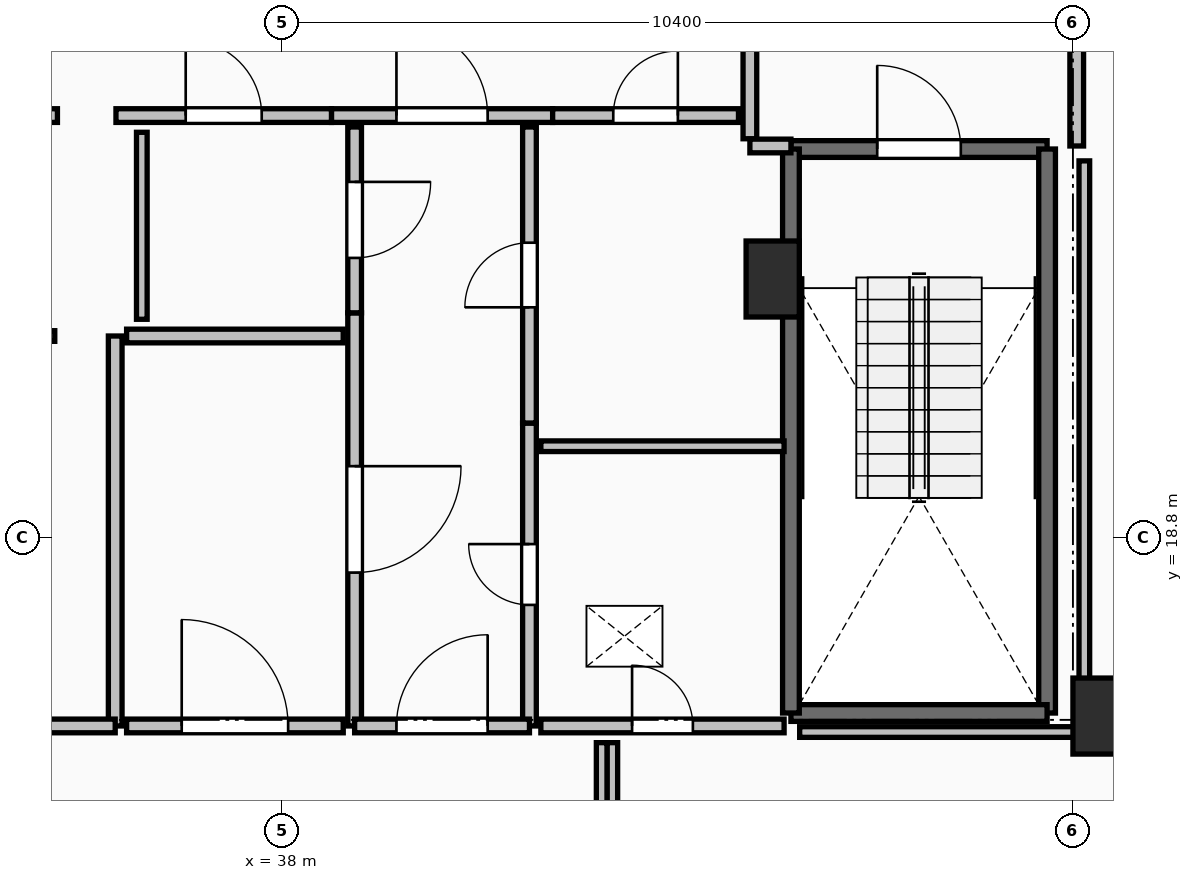
"""IFC4 building model, lengths in metres.
Left out: names, types, materials, properties, quantities, classifications, styles, units other than length and angle.
Written with IfcOpenShell. Run it as: python <this file> out.ifc"""

import sys

from ifc_helpers import new_model, si_unit, direction, frame, frame_2d, origin, origin_2d, place, context, subcontext, project, spatial, rectangle, extrude, element, fill, save


model = new_model("IFC4")
c1 = context("Model", 3, precision=1e-05, world=origin(), true_north=direction((0.0, 1.0)))
c2 = subcontext(c1, "Body", "Model", "MODEL_VIEW")
j1 = project(units=[si_unit("LENGTHUNIT", "METRE"), si_unit("PLANEANGLEUNIT", "RADIAN")], contexts=[c1])
p1 = place(None, origin())
s1 = spatial("IfcSite", under=j1, at=p1, CompositionType="ELEMENT")
p2 = place(p1, origin())
s2 = spatial("IfcBuilding", under=s1, at=p2, CompositionType="ELEMENT")
p3 = place(p2, frame((0.0, 0.0, 252.0)))
s3 = spatial("IfcBuildingStorey", under=s2, at=p3, CompositionType="ELEMENT", Elevation=252.0)
for number, where, z_axis, x_axis in (
    (1, (48.75, 16.45, 0.0), (0.0, 0.0, 1.0), (1.0, 0.0, 0.0)),
    (2, (44.45, 22.2, 0.0), (0.0, 0.0, 1.0), (1.0, 0.0, 0.0)),
):
    element("IfcColumn", number, at=place(p3, frame(where, z_axis=z_axis, x_axis=x_axis)), inside=s3, PredefinedType="PILASTER", context=c2, shape_type="SweptSolid", body=[
        extrude(rectangle(XDim=0.7, YDim=1.0, at=origin_2d()), origin(), (0.0, 0.0, 1.0), 3.55),
    ])
p4 = place(p3, frame((44.69, 23.91, 0.0), z_axis=(0.0, 0.0, 1.0), x_axis=(1.0, 0.0, 0.0)))
e3 = element("IfcWall", 3, at=p4, inside=s3, PredefinedType="SOLIDWALL", context=c2, shape_type="SweptSolid", body=[
    extrude(rectangle(XDim=3.37, YDim=0.22, at=frame_2d((1.685, 0.0))), origin(), (0.0, 0.0, 1.0), 3.29),
])
p5 = place(p4, frame((1.135, 0.0, 0.0)))
e4 = element("IfcOpeningElement", 4, at=p5, cuts=e3, PredefinedType="OPENING", context=c2, shape_type="SweptSolid", body=[
    extrude(rectangle(XDim=1.1, YDim=2.15, at=frame_2d((0.55, 1.075))), frame((0.0, 0.125, 0.0), z_axis=(0.0, -1.0, 0.0), x_axis=(1.0, 0.0, 0.0)), (0.0, 0.0, 1.0), 0.25),
])
p6 = place(p3, frame((48.06, 23.91, 0.0), z_axis=(0.0, 0.0, 1.0), x_axis=(0.0, -1.0, 0.0)))
e5 = element("IfcWall", 5, at=p6, inside=s3, PredefinedType="SOLIDWALL", context=c2, shape_type="SweptSolid", body=[
    extrude(rectangle(XDim=7.42, YDim=0.22, at=frame_2d((3.71, 0.0))), origin(), (0.0, 0.0, 1.0), 3.29),
])
p7 = place(p3, frame((48.06, 16.49, 0.0), z_axis=(0.0, 0.0, 1.0), x_axis=(-1.0, 0.0, 0.0)))
e6 = element("IfcWall", 6, at=p7, inside=s3, PredefinedType="SOLIDWALL", context=c2, shape_type="SweptSolid", body=[
    extrude(rectangle(XDim=3.37, YDim=0.22, at=frame_2d((1.685, 0.0))), origin(), (0.0, 0.0, 1.0), 3.29),
])
p8 = place(p3, frame((44.69, 16.49, 0.0), z_axis=(0.0, 0.0, 1.0), x_axis=(0.0, 1.0, 0.0)))
e7 = element("IfcWall", 7, at=p8, inside=s3, PredefinedType="SOLIDWALL", context=c2, shape_type="SweptSolid", body=[
    extrude(rectangle(XDim=7.42, YDim=0.22, at=frame_2d((3.71, 0.0))), origin(), (0.0, 0.0, 1.0), 3.29),
])
p9 = place(p3, frame((44.15, 27.955, 0.0), z_axis=(0.0, 0.0, 1.0), x_axis=(0.0, -1.0, 0.0)))
e8 = element("IfcWall", 8, at=p9, inside=s3, PredefinedType="PARTITIONING", context=c2, shape_type="SweptSolid", body=[
    extrude(rectangle(XDim=3.91, YDim=0.18, at=frame_2d((1.955, 0.0))), origin(), (0.0, 0.0, 1.0), 3.29),
])
p10 = place(p9, frame((1.355, 0.0, 0.0)))
e9 = element("IfcOpeningElement", 9, at=p10, cuts=e8, PredefinedType="OPENING", context=c2, shape_type="SweptSolid", body=[
    extrude(rectangle(XDim=1.2, YDim=2.15, at=frame_2d((0.6, 1.075))), frame((0.0, 0.105, 0.0), z_axis=(0.0, -1.0, 0.0), x_axis=(1.0, 0.0, 0.0)), (0.0, 0.0, 1.0), 0.21),
])
p11 = place(p3, frame((44.15, 23.95, 0.0), z_axis=(0.0, 0.0, 1.0), x_axis=(1.0, 0.0, 0.0)))
e10 = element("IfcWall", 10, at=p11, inside=s3, PredefinedType="PARTITIONING", context=c2, shape_type="SweptSolid", body=[
    extrude(rectangle(XDim=0.54, YDim=0.18, at=frame_2d((0.27, 0.0))), origin(), (0.0, 0.0, 1.0), 3.29),
])
p12 = place(p3, frame((48.45, 23.95, 0.0), z_axis=(0.0, 0.0, 1.0), x_axis=(0.0, 1.0, 0.0)))
e11 = element("IfcWall", 11, at=p12, inside=s3, PredefinedType="PARTITIONING", context=c2, shape_type="SweptSolid", body=[
    extrude(rectangle(XDim=4.05, YDim=0.18, at=frame_2d((2.025, 0.0))), origin(), (0.0, 0.0, 1.0), 3.29),
])
p13 = place(p12, frame((1.425, 0.0, 0.0)))
e12 = element("IfcOpeningElement", 12, at=p13, cuts=e11, PredefinedType="OPENING", context=c2, shape_type="SweptSolid", body=[
    extrude(rectangle(XDim=1.2, YDim=2.15, at=frame_2d((0.6, 1.075))), frame((0.0, 0.105, 0.0), z_axis=(0.0, -1.0, 0.0), x_axis=(1.0, 0.0, 0.0)), (0.0, 0.0, 1.0), 0.21),
])
p14 = place(p3, frame((38.645, 24.35, 0.0), z_axis=(0.0, 0.0, 1.0), x_axis=(1.0, 0.0, 0.0)))
e13 = element("IfcWall", 13, at=p14, inside=s3, PredefinedType="PARTITIONING", context=c2, shape_type="SweptSolid", body=[
    extrude(rectangle(XDim=2.91, YDim=0.18, at=frame_2d((1.455, 0.0))), origin(), (0.0, 0.0, 1.0), 3.29),
])
p15 = place(p14, frame((0.855, 0.0, 0.0)))
e14 = element("IfcOpeningElement", 14, at=p15, cuts=e13, PredefinedType="OPENING", context=c2, shape_type="SweptSolid", body=[
    extrude(rectangle(XDim=1.2, YDim=2.15, at=frame_2d((0.6, 1.075))), frame((0.0, 0.105, 0.0), z_axis=(0.0, -1.0, 0.0), x_axis=(1.0, 0.0, 0.0)), (0.0, 0.0, 1.0), 0.21),
])
p16 = place(p3, frame((41.555, 24.35, 0.0), z_axis=(0.0, 0.0, 1.0), x_axis=(1.0, 0.0, 0.0)))
e15 = element("IfcWall", 15, at=p16, inside=s3, PredefinedType="PARTITIONING", context=c2, shape_type="SweptSolid", body=[
    extrude(rectangle(XDim=2.445, YDim=0.18, at=frame_2d((1.223, 0.0))), origin(), (0.0, 0.0, 1.0), 3.29),
])
p17 = place(p16, frame((0.798, 0.0, 0.0)))
e16 = element("IfcOpeningElement", 16, at=p17, cuts=e15, PredefinedType="OPENING", context=c2, shape_type="SweptSolid", body=[
    extrude(rectangle(XDim=0.85, YDim=2.1, at=frame_2d((0.425, 1.05))), frame((0.0, 0.105, 0.0), z_axis=(0.0, -1.0, 0.0), x_axis=(1.0, 0.0, 0.0)), (0.0, 0.0, 1.0), 0.21),
])
p18 = place(p3, frame((32.0, 24.35, 0.0), z_axis=(0.0, 0.0, 1.0), x_axis=(1.0, 0.0, 0.0)))
e17 = element("IfcWall", 17, at=p18, inside=s3, PredefinedType="PARTITIONING", context=c2, shape_type="SweptSolid", body=[
    extrude(rectangle(XDim=3.04, YDim=0.18, at=frame_2d((1.52, 0.0))), origin(), (0.0, 0.0, 1.0), 3.29),
])
p19 = place(p18, frame((1.095, 0.0, 0.0)))
e18 = element("IfcOpeningElement", 18, at=p19, cuts=e17, PredefinedType="OPENING", context=c2, shape_type="SweptSolid", body=[
    extrude(rectangle(XDim=0.85, YDim=2.1, at=frame_2d((0.425, 1.05))), frame((0.0, 0.105, 0.0), z_axis=(0.0, -1.0, 0.0), x_axis=(1.0, 0.0, 0.0)), (0.0, 0.0, 1.0), 0.21),
])
p20 = place(p3, frame((35.81, 24.35, 0.0), z_axis=(0.0, 0.0, 1.0), x_axis=(1.0, 0.0, 0.0)))
e19 = element("IfcWall", 19, at=p20, inside=s3, PredefinedType="PARTITIONING", context=c2, shape_type="SweptSolid", body=[
    extrude(rectangle(XDim=2.835, YDim=0.18, at=frame_2d((1.417, 0.0))), origin(), (0.0, 0.0, 1.0), 3.29),
])
p21 = place(p20, frame((0.917, 0.0, 0.0)))
e20 = element("IfcOpeningElement", 20, at=p21, cuts=e19, PredefinedType="OPENING", context=c2, shape_type="SweptSolid", body=[
    extrude(rectangle(XDim=1.0, YDim=2.15, at=frame_2d((0.5, 1.075))), frame((0.0, 0.105, 0.0), z_axis=(0.0, -1.0, 0.0), x_axis=(1.0, 0.0, 0.0)), (0.0, 0.0, 1.0), 0.21),
])
p22 = place(p3, frame((41.25, 16.32, 0.0), z_axis=(0.0, 0.0, 1.0), x_axis=(0.0, 1.0, 0.0)))
e21 = element("IfcWall", 21, at=p22, inside=s3, PredefinedType="PARTITIONING", context=c2, shape_type="SweptSolid", body=[
    extrude(rectangle(XDim=3.985, YDim=0.18, at=frame_2d((1.992, 0.0))), origin(), (0.0, 0.0, 1.0), 3.29),
])
p23 = place(p22, frame((1.593, 0.0, 0.0)))
e22 = element("IfcOpeningElement", 22, at=p23, cuts=e21, PredefinedType="OPENING", context=c2, shape_type="SweptSolid", body=[
    extrude(rectangle(XDim=0.8, YDim=2.05, at=frame_2d((0.4, 1.025))), frame((0.0, 0.105, 0.0), z_axis=(0.0, -1.0, 0.0), x_axis=(1.0, 0.0, 0.0)), (0.0, 0.0, 1.0), 0.21),
])
p24 = place(p3, frame((41.25, 20.305, 0.0), z_axis=(0.0, 0.0, 1.0), x_axis=(0.0, 1.0, 0.0)))
e23 = element("IfcWall", 23, at=p24, inside=s3, PredefinedType="PARTITIONING", context=c2, shape_type="SweptSolid", body=[
    extrude(rectangle(XDim=3.895, YDim=0.18, at=frame_2d((1.948, 0.0))), origin(), (0.0, 0.0, 1.0), 2.482),
])
p25 = place(p24, frame((1.522, 0.0, 0.0)))
e24 = element("IfcOpeningElement", 24, at=p25, cuts=e23, PredefinedType="OPENING", context=c2, shape_type="SweptSolid", body=[
    extrude(rectangle(XDim=0.85, YDim=2.1, at=frame_2d((0.425, 1.05))), frame((0.0, 0.105, 0.0), z_axis=(0.0, -1.0, 0.0), x_axis=(1.0, 0.0, 0.0)), (0.0, 0.0, 1.0), 0.21),
])
p26 = place(p3, frame((38.95, 21.755, 0.0), z_axis=(0.0, 0.0, 1.0), x_axis=(0.0, -1.0, 0.0)))
e25 = element("IfcWall", 25, at=p26, inside=s3, PredefinedType="PARTITIONING", context=c2, shape_type="SweptSolid", body=[
    extrude(rectangle(XDim=5.435, YDim=0.18, at=frame_2d((2.717, 0.0))), origin(), (0.0, 0.0, 1.0), 3.29),
])
p27 = place(p26, frame((2.018, 0.0, 0.0)))
e26 = element("IfcOpeningElement", 26, at=p27, cuts=e25, PredefinedType="OPENING", context=c2, shape_type="SweptSolid", body=[
    extrude(rectangle(XDim=1.4, YDim=2.2, at=frame_2d((0.7, 1.1))), frame((0.0, 0.105, 0.0), z_axis=(0.0, -1.0, 0.0), x_axis=(1.0, 0.0, 0.0)), (0.0, 0.0, 1.0), 0.21),
])
p28 = place(p3, frame((38.95, 24.2, 0.0), z_axis=(0.0, 0.0, 1.0), x_axis=(0.0, -1.0, 0.0)))
e27 = element("IfcWall", 27, at=p28, inside=s3, PredefinedType="PARTITIONING", context=c2, shape_type="SweptSolid", body=[
    extrude(rectangle(XDim=2.445, YDim=0.18, at=frame_2d((1.223, 0.0))), origin(), (0.0, 0.0, 1.0), 2.482),
])
p29 = place(p28, frame((0.722, 0.0, 0.0)))
e28 = element("IfcOpeningElement", 28, at=p29, cuts=e27, PredefinedType="OPENING", context=c2, shape_type="SweptSolid", body=[
    extrude(rectangle(XDim=1.0, YDim=2.15, at=frame_2d((0.5, 1.075))), frame((0.0, 0.105, 0.0), z_axis=(0.0, -1.0, 0.0), x_axis=(1.0, 0.0, 0.0)), (0.0, 0.0, 1.0), 0.21),
])
p30 = place(p3, frame((38.95, 16.32, 0.0), z_axis=(0.0, 0.0, 1.0), x_axis=(1.0, 0.0, 0.0)))
e29 = element("IfcWall", 29, at=p30, inside=s3, PredefinedType="PARTITIONING", context=c2, shape_type="SweptSolid", body=[
    extrude(rectangle(XDim=2.3, YDim=0.18, at=frame_2d((1.15, 0.0))), origin(), (0.0, 0.0, 1.0), 3.29),
])
p31 = place(p30, frame((0.55, 0.0, 0.0)))
e30 = element("IfcOpeningElement", 30, at=p31, cuts=e29, PredefinedType="OPENING", context=c2, shape_type="SweptSolid", body=[
    extrude(rectangle(XDim=1.2, YDim=2.15, at=frame_2d((0.6, 1.075))), frame((0.0, 0.105, 0.0), z_axis=(0.0, -1.0, 0.0), x_axis=(1.0, 0.0, 0.0)), (0.0, 0.0, 1.0), 0.21),
])
p32 = place(p3, frame((44.6, 20.0, 0.0), z_axis=(0.0, 0.0, 1.0), x_axis=(-1.0, 0.0, 0.0)))
e31 = element("IfcWall", 31, at=p32, inside=s3, PredefinedType="PARTITIONING", context=c2, shape_type="SweptSolid", body=[
    extrude(rectangle(XDim=3.2, YDim=0.14, at=frame_2d((1.6, 0.0))), origin(), (0.0, 0.0, 1.0), 3.29),
])
p33 = place(p3, frame((41.4, 16.32, 0.0), z_axis=(0.0, 0.0, 1.0), x_axis=(1.0, 0.0, 0.0)))
e32 = element("IfcWall", 32, at=p33, inside=s3, PredefinedType="PARTITIONING", context=c2, shape_type="SweptSolid", body=[
    extrude(rectangle(XDim=3.2, YDim=0.18, at=frame_2d((1.6, 0.0))), origin(), (0.0, 0.0, 1.0), 3.29),
])
p34 = place(p33, frame((1.2, 0.0, 0.0)))
e33 = element("IfcOpeningElement", 33, at=p34, cuts=e32, PredefinedType="OPENING", context=c2, shape_type="SweptSolid", body=[
    extrude(rectangle(XDim=0.8, YDim=2.05, at=frame_2d((0.4, 1.025))), frame((0.0, 0.105, 0.0), z_axis=(0.0, -1.0, 0.0), x_axis=(1.0, 0.0, 0.0)), (0.0, 0.0, 1.0), 0.21),
])
p35 = place(p3, frame((35.8, 16.32, 0.0), z_axis=(0.0, 0.0, 1.0), x_axis=(0.0, 1.0, 0.0)))
e34 = element("IfcWall", 34, at=p35, inside=s3, PredefinedType="PARTITIONING", context=c2, shape_type="SweptSolid", body=[
    extrude(rectangle(XDim=5.13, YDim=0.18, at=frame_2d((2.565, 0.0))), origin(), (0.0, 0.0, 1.0), 3.29),
])
p36 = place(p3, frame((35.005, 21.45, 0.0), z_axis=(0.0, 0.0, 1.0), x_axis=(-1.0, 0.0, 0.0)))
e35 = element("IfcWall", 35, at=p36, inside=s3, PredefinedType="PARTITIONING", context=c2, shape_type="SweptSolid", body=[
    extrude(rectangle(XDim=3.11, YDim=0.14, at=frame_2d((1.555, 0.0))), origin(), (0.0, 0.0, 1.0), 3.29),
])
p37 = place(p3, frame((31.4, 16.32, 0.0), z_axis=(0.0, 0.0, 1.0), x_axis=(1.0, 0.0, 0.0)))
e36 = element("IfcWall", 36, at=p37, inside=s3, PredefinedType="PARTITIONING", context=c2, shape_type="SweptSolid", body=[
    extrude(rectangle(XDim=4.4, YDim=0.18, at=frame_2d((2.2, 0.0))), origin(), (0.0, 0.0, 1.0), 3.29),
])
p38 = place(p37, frame((1.775, 0.0, 0.0)))
e37 = element("IfcOpeningElement", 37, at=p38, cuts=e36, PredefinedType="OPENING", context=c2, shape_type="SweptSolid", body=[
    extrude(rectangle(XDim=0.85, YDim=2.1, at=frame_2d((0.425, 1.05))), frame((0.0, 0.105, 0.0), z_axis=(0.0, -1.0, 0.0), x_axis=(1.0, 0.0, 0.0)), (0.0, 0.0, 1.0), 0.21),
])
p39 = place(p3, frame((38.8, 21.45, 0.0), z_axis=(0.0, 0.0, 1.0), x_axis=(-1.0, 0.0, 0.0)))
e38 = element("IfcWall", 38, at=p39, inside=s3, PredefinedType="PARTITIONING", context=c2, shape_type="SweptSolid", body=[
    extrude(rectangle(XDim=2.85, YDim=0.18, at=frame_2d((1.425, 0.0))), origin(), (0.0, 0.0, 1.0), 3.29),
])
p40 = place(p3, frame((35.95, 16.32, 0.0), z_axis=(0.0, 0.0, 1.0), x_axis=(1.0, 0.0, 0.0)))
e39 = element("IfcWall", 39, at=p40, inside=s3, PredefinedType="PARTITIONING", context=c2, shape_type="SweptSolid", body=[
    extrude(rectangle(XDim=2.85, YDim=0.18, at=frame_2d((1.425, 0.0))), origin(), (0.0, 0.0, 1.0), 3.29),
])
p41 = place(p40, frame((0.725, 0.0, 0.0)))
e40 = element("IfcOpeningElement", 40, at=p41, cuts=e39, PredefinedType="OPENING", context=c2, shape_type="SweptSolid", body=[
    extrude(rectangle(XDim=1.4, YDim=2.2, at=frame_2d((0.7, 1.1))), frame((0.0, 0.105, 0.0), z_axis=(0.0, -1.0, 0.0), x_axis=(1.0, 0.0, 0.0)), (0.0, 0.0, 1.0), 0.21),
])
p42 = place(p3, frame((36.15, 24.13, 0.0), z_axis=(0.0, 0.0, 1.0), x_axis=(0.0, -1.0, 0.0)))
e41 = element("IfcWall", 41, at=p42, inside=s3, PredefinedType="PARTITIONING", context=c2, shape_type="SweptSolid", body=[
    extrude(rectangle(XDim=2.46, YDim=0.14, at=frame_2d((1.23, 0.0))), origin(), (0.0, 0.0, 1.0), 2.482),
])
p43 = place(p3, frame((42.34, 14.27, 0.0), z_axis=(0.0, 0.0, 1.0), x_axis=(0.0, 1.0, 0.0)))
e42 = element("IfcWall", 42, at=p43, inside=s3, PredefinedType="PARTITIONING", context=c2, shape_type="SweptSolid", body=[
    extrude(rectangle(XDim=1.83, YDim=0.14, at=frame_2d((0.915, 0.0))), origin(), (0.0, 0.0, 1.0), 3.022),
])
p44 = place(p3, frame((44.805, 16.24, 0.0), z_axis=(0.0, 0.0, 1.0), x_axis=(1.0, 0.0, 0.0)))
e43 = element("IfcWall", 43, at=p44, inside=s3, PredefinedType="PARTITIONING", context=c2, shape_type="SweptSolid", body=[
    extrude(rectangle(XDim=3.745, YDim=0.14, at=frame_2d((1.873, 0.0))), origin(), (0.0, 0.0, 1.0), 2.482),
])
p45 = place(p3, frame((48.55, 16.24, 0.0), z_axis=(0.0, 0.0, 1.0), x_axis=(0.0, 1.0, 0.0)))
e44 = element("IfcWall", 44, at=p45, inside=s3, PredefinedType="PARTITIONING", context=c2, shape_type="SweptSolid", body=[
    extrude(rectangle(XDim=7.514, YDim=0.14, at=frame_2d((3.757, 0.0))), origin(), (0.0, 0.0, 1.0), 2.482),
])
p46 = place(p3, frame((42.2, 16.1, 0.0), z_axis=(0.0, 0.0, 1.0), x_axis=(0.0, -1.0, 0.0)))
e45 = element("IfcWall", 45, at=p46, inside=s3, PredefinedType="PARTITIONING", context=c2, shape_type="SweptSolid", body=[
    extrude(rectangle(XDim=1.83, YDim=0.14, at=frame_2d((0.915, 0.0))), origin(), (0.0, 0.0, 1.0), 3.022),
])
p47 = place(p5, origin())
e46 = element("IfcDoor", 46, at=p47, inside=s3, OperationType="SINGLE_SWING_LEFT", PredefinedType="DOOR", context=c2, shape_type="SweptSolid", body=[
    extrude(rectangle(XDim=1.1, YDim=2.15, at=frame_2d((0.55, 1.075))), frame((0.0, 0.025, 0.0), z_axis=(0.0, -1.0, 0.0), x_axis=(1.0, 0.0, 0.0)), (0.0, 0.0, 1.0), 0.05),
])
fill(e4, e46)
p48 = place(p15, origin())
e47 = element("IfcDoor", 47, at=p48, inside=s3, OperationType="SINGLE_SWING_LEFT", PredefinedType="DOOR", context=c2, shape_type="SweptSolid", body=[
    extrude(rectangle(XDim=1.2, YDim=2.15, at=frame_2d((0.6, 1.075))), frame((0.0, 0.025, 0.0), z_axis=(0.0, -1.0, 0.0), x_axis=(1.0, 0.0, 0.0)), (0.0, 0.0, 1.0), 0.05),
])
fill(e14, e47)
p49 = place(p17, origin())
e48 = element("IfcDoor", 48, at=p49, inside=s3, OperationType="SINGLE_SWING_RIGHT", PredefinedType="DOOR", context=c2, shape_type="SweptSolid", body=[
    extrude(rectangle(XDim=0.85, YDim=2.1, at=frame_2d((0.425, 1.05))), frame((0.0, 0.025, 0.0), z_axis=(0.0, -1.0, 0.0), x_axis=(1.0, 0.0, 0.0)), (0.0, 0.0, 1.0), 0.05),
])
fill(e16, e48)
p50 = place(p21, origin())
e49 = element("IfcDoor", 49, at=p50, inside=s3, OperationType="SINGLE_SWING_LEFT", PredefinedType="DOOR", context=c2, shape_type="SweptSolid", body=[
    extrude(rectangle(XDim=1.0, YDim=2.15, at=frame_2d((0.5, 1.075))), frame((0.0, 0.025, 0.0), z_axis=(0.0, -1.0, 0.0), x_axis=(1.0, 0.0, 0.0)), (0.0, 0.0, 1.0), 0.05),
])
fill(e20, e49)
p51 = place(p23, origin())
e50 = element("IfcDoor", 50, at=p51, inside=s3, OperationType="SINGLE_SWING_RIGHT", PredefinedType="DOOR", context=c2, shape_type="SweptSolid", body=[
    extrude(rectangle(XDim=0.8, YDim=2.05, at=frame_2d((0.4, 1.025))), frame((0.0, 0.025, 0.0), z_axis=(0.0, -1.0, 0.0), x_axis=(1.0, 0.0, 0.0)), (0.0, 0.0, 1.0), 0.05),
])
fill(e22, e50)
p52 = place(p25, origin())
e51 = element("IfcDoor", 51, at=p52, inside=s3, OperationType="SINGLE_SWING_LEFT", PredefinedType="DOOR", context=c2, shape_type="SweptSolid", body=[
    extrude(rectangle(XDim=0.85, YDim=2.1, at=frame_2d((0.425, 1.05))), frame((0.0, 0.025, 0.0), z_axis=(0.0, -1.0, 0.0), x_axis=(1.0, 0.0, 0.0)), (0.0, 0.0, 1.0), 0.05),
])
fill(e24, e51)
p53 = place(p27, origin())
e52 = element("IfcDoor", 52, at=p53, inside=s3, OperationType="DOUBLE_SWING_LEFT", PredefinedType="DOOR", context=c2, shape_type="SweptSolid", body=[
    extrude(rectangle(XDim=1.4, YDim=2.2, at=frame_2d((0.7, 1.1))), frame((0.0, 0.025, 0.0), z_axis=(0.0, -1.0, 0.0), x_axis=(1.0, 0.0, 0.0)), (0.0, 0.0, 1.0), 0.05),
])
fill(e26, e52)
p54 = place(p29, origin())
e53 = element("IfcDoor", 53, at=p54, inside=s3, OperationType="SINGLE_SWING_LEFT", PredefinedType="DOOR", context=c2, shape_type="SweptSolid", body=[
    extrude(rectangle(XDim=1.0, YDim=2.15, at=frame_2d((0.5, 1.075))), frame((0.0, 0.025, 0.0), z_axis=(0.0, -1.0, 0.0), x_axis=(1.0, 0.0, 0.0)), (0.0, 0.0, 1.0), 0.05),
])
fill(e28, e53)
p55 = place(p31, origin())
e54 = element("IfcDoor", 54, at=p55, inside=s3, OperationType="SINGLE_SWING_RIGHT", PredefinedType="DOOR", context=c2, shape_type="SweptSolid", body=[
    extrude(rectangle(XDim=1.2, YDim=2.15, at=frame_2d((0.6, 1.075))), frame((0.0, 0.025, 0.0), z_axis=(0.0, -1.0, 0.0), x_axis=(1.0, 0.0, 0.0)), (0.0, 0.0, 1.0), 0.05),
])
fill(e30, e54)
p56 = place(p34, origin())
e55 = element("IfcDoor", 55, at=p56, inside=s3, OperationType="SINGLE_SWING_LEFT", PredefinedType="DOOR", context=c2, shape_type="SweptSolid", body=[
    extrude(rectangle(XDim=0.8, YDim=2.05, at=frame_2d((0.4, 1.025))), frame((0.0, 0.025, 0.0), z_axis=(0.0, -1.0, 0.0), x_axis=(1.0, 0.0, 0.0)), (0.0, 0.0, 1.0), 0.05),
])
fill(e33, e55)
p57 = place(p41, origin())
e56 = element("IfcDoor", 56, at=p57, inside=s3, OperationType="DOUBLE_SWING_LEFT", PredefinedType="DOOR", context=c2, shape_type="SweptSolid", body=[
    extrude(rectangle(XDim=1.4, YDim=2.2, at=frame_2d((0.7, 1.1))), frame((0.0, 0.025, 0.0), z_axis=(0.0, -1.0, 0.0), x_axis=(1.0, 0.0, 0.0)), (0.0, 0.0, 1.0), 0.05),
])
fill(e40, e56)
save(model, sys.argv[1])
